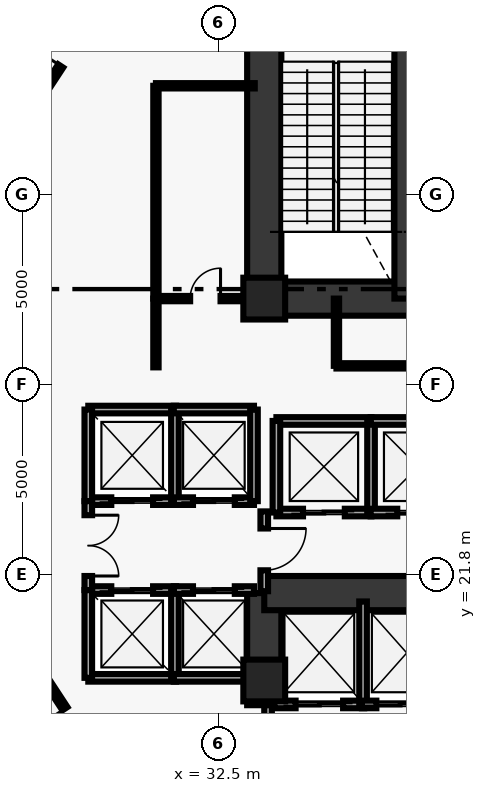
"""IFC4 building model, lengths in metres.
Left out: names, types, materials, properties, quantities, classifications, styles, units other than length and angle.
Written with IfcOpenShell. Run it as: python <this file> out.ifc"""

import sys

from ifc_helpers import new_model, si_unit, direction, frame, frame_2d, origin, origin_2d, place, context, subcontext, project, spatial, rectangle, extrude, element, fill, save


model = new_model("IFC4")
c1 = context("Model", 3, precision=1e-05, world=origin(), true_north=direction((0.0, 1.0)))
c2 = subcontext(c1, "Body", "Model", "MODEL_VIEW")
j1 = project(units=[si_unit("LENGTHUNIT", "METRE"), si_unit("PLANEANGLEUNIT", "RADIAN")], contexts=[c1])
p1 = place(None, origin())
s1 = spatial("IfcSite", under=j1, at=p1, CompositionType="ELEMENT")
p2 = place(p1, origin())
s2 = spatial("IfcBuilding", under=s1, at=p2, CompositionType="ELEMENT")
p3 = place(p2, origin())
s3 = spatial("IfcBuildingStorey", under=s2, at=p3, CompositionType="ELEMENT", Elevation=0.0)
for number, where, z_axis, x_axis in (
    (1, (33.7, 19.0, 0.0), (0.0, 0.0, 1.0), (1.0, 0.0, 0.0)),
    (2, (33.7, 29.05, 0.0), (0.0, 0.0, 1.0), (1.0, 0.0, 0.0)),
):
    element("IfcColumn", number, at=place(p3, frame(where, z_axis=z_axis, x_axis=x_axis)), inside=s3, PredefinedType="PILASTER", context=c2, shape_type="SweptSolid", body=[
        extrude(rectangle(XDim=1.1, YDim=1.1, at=origin_2d()), origin(), (0.0, 0.0, 1.0), 5.7),
    ])
p4 = place(p3, frame((33.7, 29.05, 0.0), z_axis=(0.0, 0.0, 1.0), x_axis=(0.0, 1.0, 0.0)))
e3 = element("IfcWall", 3, at=p4, inside=s3, PredefinedType="SHEAR", context=c2, shape_type="SweptSolid", body=[
    extrude(rectangle(XDim=8.35, YDim=0.9, at=frame_2d((4.175, 0.0))), origin(), (0.0, 0.0, 1.0), 5.7),
])
p5 = place(p3, frame((33.7, 18.35, 0.0), z_axis=(0.0, 0.0, 1.0), x_axis=(0.0, 1.0, 0.0)))
e4 = element("IfcWall", 4, at=p5, inside=s3, PredefinedType="SHEAR", context=c2, shape_type="SweptSolid", body=[
    extrude(rectangle(XDim=2.95, YDim=0.9, at=frame_2d((1.475, 0.0))), origin(), (0.0, 0.0, 1.0), 5.7),
])
p6 = place(p3, frame((33.7, 29.05, 0.0), z_axis=(0.0, 0.0, 1.0), x_axis=(1.0, 0.0, 0.0)))
e5 = element("IfcWall", 5, at=p6, inside=s3, PredefinedType="SHEAR", context=c2, shape_type="SweptSolid", body=[
    extrude(rectangle(XDim=10.6, YDim=0.9, at=frame_2d((5.3, 0.0))), origin(), (0.0, 0.0, 1.0), 5.7),
])
p7 = place(p3, frame((33.7, 21.3, 0.0), z_axis=(0.0, 0.0, 1.0), x_axis=(1.0, 0.0, 0.0)))
e6 = element("IfcWall", 6, at=p7, inside=s3, PredefinedType="SHEAR", context=c2, shape_type="SweptSolid", body=[
    extrude(rectangle(XDim=7.55, YDim=0.9, at=frame_2d((3.775, 0.0))), origin(), (0.0, 0.0, 1.0), 5.7),
])
p8 = place(p3, frame((37.35, 29.05, 0.0), z_axis=(0.0, 0.0, 1.0), x_axis=(0.0, 1.0, 0.0)))
e7 = element("IfcWall", 7, at=p8, inside=s3, PredefinedType="SHEAR", context=c2, shape_type="SweptSolid", body=[
    extrude(rectangle(XDim=8.35, YDim=0.45, at=frame_2d((4.175, 0.0))), origin(), (0.0, 0.0, 1.0), 5.7),
])
p9 = place(p3, frame((35.6, 27.28, 0.0), z_axis=(0.0, 0.0, 1.0), x_axis=(0.0, 1.0, 0.0)))
e8 = element("IfcWall", 8, at=p9, inside=s3, PredefinedType="PARTITIONING", context=c2, shape_type="SweptSolid", body=[
    extrude(rectangle(XDim=1.77, YDim=0.14, at=frame_2d((0.885, 0.0))), origin(), (0.0, 0.0, 1.0), 5.7),
])
p10 = place(p3, frame((29.07, 23.72, 0.0), z_axis=(0.0, 0.0, 1.0), x_axis=(1.0, 0.0, 0.0)))
e9 = element("IfcWall", 9, at=p10, inside=s3, PredefinedType="SOLIDWALL", context=c2, shape_type="SweptSolid", body=[
    extrude(rectangle(XDim=2.31, YDim=0.2, at=frame_2d((1.155, 0.0))), origin(), (0.0, 0.0, 1.0), 5.7),
])
p11 = place(p10, frame((0.605, 0.0, 0.0)))
e10 = element("IfcOpeningElement", 10, at=p11, cuts=e9, PredefinedType="OPENING", context=c2, shape_type="SweptSolid", body=[
    extrude(rectangle(XDim=1.1, YDim=2.15, at=frame_2d((0.55, 1.075))), frame((0.0, 0.11, 0.0), z_axis=(0.0, -1.0, 0.0), x_axis=(1.0, 0.0, 0.0)), (0.0, 0.0, 1.0), 0.22),
])
p12 = place(p3, frame((29.07, 26.13, 0.0), z_axis=(0.0, 0.0, 1.0), x_axis=(1.0, 0.0, 0.0)))
e11 = element("IfcWall", 11, at=p12, inside=s3, PredefinedType="SOLIDWALL", context=c2, shape_type="SweptSolid", body=[
    extrude(rectangle(XDim=2.31, YDim=0.2, at=frame_2d((1.155, 0.0))), origin(), (0.0, 0.0, 1.0), 5.7),
])
for number, where, z_axis, x_axis in (
    (12, (29.07, 23.72, 0.0), (0.0, 0.0, 1.0), (0.0, 1.0, 0.0)),
    (13, (31.35, 23.72, 0.0), (0.0, 0.0, 1.0), (0.0, 1.0, 0.0)),
):
    element("IfcWall", number, at=place(p3, frame(where, z_axis=z_axis, x_axis=x_axis)), inside=s3, PredefinedType="SOLIDWALL", context=c2, shape_type="SweptSolid", body=[
        extrude(rectangle(XDim=2.41, YDim=0.2, at=frame_2d((1.205, 0.0))), origin(), (0.0, 0.0, 1.0), 5.7),
    ])
p13 = place(p3, frame((31.32, 23.72, 0.0), z_axis=(0.0, 0.0, 1.0), x_axis=(1.0, 0.0, 0.0)))
e14 = element("IfcWall", 14, at=p13, inside=s3, PredefinedType="SOLIDWALL", context=c2, shape_type="SweptSolid", body=[
    extrude(rectangle(XDim=2.11, YDim=0.2, at=frame_2d((1.055, 0.0))), origin(), (0.0, 0.0, 1.0), 5.7),
])
p14 = place(p13, frame((0.505, 0.0, 0.0)))
e15 = element("IfcOpeningElement", 15, at=p14, cuts=e14, PredefinedType="OPENING", context=c2, shape_type="SweptSolid", body=[
    extrude(rectangle(XDim=1.1, YDim=2.15, at=frame_2d((0.55, 1.075))), frame((0.0, 0.11, 0.0), z_axis=(0.0, -1.0, 0.0), x_axis=(1.0, 0.0, 0.0)), (0.0, 0.0, 1.0), 0.22),
])
p15 = place(p3, frame((31.32, 26.13, 0.0), z_axis=(0.0, 0.0, 1.0), x_axis=(1.0, 0.0, 0.0)))
e16 = element("IfcWall", 16, at=p15, inside=s3, PredefinedType="SOLIDWALL", context=c2, shape_type="SweptSolid", body=[
    extrude(rectangle(XDim=2.11, YDim=0.2, at=frame_2d((1.055, 0.0))), origin(), (0.0, 0.0, 1.0), 5.7),
])
p16 = place(p3, frame((33.43, 23.72, 0.0), z_axis=(0.0, 0.0, 1.0), x_axis=(0.0, 1.0, 0.0)))
e17 = element("IfcWall", 17, at=p16, inside=s3, PredefinedType="SOLIDWALL", context=c2, shape_type="SweptSolid", body=[
    extrude(rectangle(XDim=2.41, YDim=0.2, at=frame_2d((1.205, 0.0))), origin(), (0.0, 0.0, 1.0), 5.7),
])
p17 = place(p3, frame((29.07, 19.07, 0.0), z_axis=(0.0, 0.0, 1.0), x_axis=(1.0, 0.0, 0.0)))
e18 = element("IfcWall", 18, at=p17, inside=s3, PredefinedType="SOLIDWALL", context=c2, shape_type="SweptSolid", body=[
    extrude(rectangle(XDim=2.31, YDim=0.2, at=frame_2d((1.155, 0.0))), origin(), (0.0, 0.0, 1.0), 5.7),
])
p18 = place(p3, frame((29.07, 21.38, 0.0), z_axis=(0.0, 0.0, 1.0), x_axis=(1.0, 0.0, 0.0)))
e19 = element("IfcWall", 19, at=p18, inside=s3, PredefinedType="SOLIDWALL", context=c2, shape_type="SweptSolid", body=[
    extrude(rectangle(XDim=2.31, YDim=0.2, at=frame_2d((1.155, 0.0))), origin(), (0.0, 0.0, 1.0), 5.7),
])
p19 = place(p18, frame((0.605, 0.0, 0.0)))
e20 = element("IfcOpeningElement", 20, at=p19, cuts=e19, PredefinedType="OPENING", context=c2, shape_type="SweptSolid", body=[
    extrude(rectangle(XDim=1.1, YDim=2.15, at=frame_2d((0.55, 1.075))), frame((0.0, 0.11, 0.0), z_axis=(0.0, -1.0, 0.0), x_axis=(1.0, 0.0, 0.0)), (0.0, 0.0, 1.0), 0.22),
])
for number, where, z_axis, x_axis in (
    (21, (29.07, 19.07, 0.0), (0.0, 0.0, 1.0), (0.0, 1.0, 0.0)),
    (22, (31.35, 19.07, 0.0), (0.0, 0.0, 1.0), (0.0, 1.0, 0.0)),
):
    element("IfcWall", number, at=place(p3, frame(where, z_axis=z_axis, x_axis=x_axis)), inside=s3, PredefinedType="SOLIDWALL", context=c2, shape_type="SweptSolid", body=[
        extrude(rectangle(XDim=2.31, YDim=0.2, at=frame_2d((1.155, 0.0))), origin(), (0.0, 0.0, 1.0), 5.7),
    ])
p20 = place(p3, frame((31.32, 19.07, 0.0), z_axis=(0.0, 0.0, 1.0), x_axis=(1.0, 0.0, 0.0)))
e23 = element("IfcWall", 23, at=p20, inside=s3, PredefinedType="SOLIDWALL", context=c2, shape_type="SweptSolid", body=[
    extrude(rectangle(XDim=2.11, YDim=0.2, at=frame_2d((1.055, 0.0))), origin(), (0.0, 0.0, 1.0), 5.7),
])
p21 = place(p3, frame((31.32, 21.38, 0.0), z_axis=(0.0, 0.0, 1.0), x_axis=(1.0, 0.0, 0.0)))
e24 = element("IfcWall", 24, at=p21, inside=s3, PredefinedType="SOLIDWALL", context=c2, shape_type="SweptSolid", body=[
    extrude(rectangle(XDim=2.11, YDim=0.2, at=frame_2d((1.055, 0.0))), origin(), (0.0, 0.0, 1.0), 5.7),
])
p22 = place(p21, frame((0.505, 0.0, 0.0)))
e25 = element("IfcOpeningElement", 25, at=p22, cuts=e24, PredefinedType="OPENING", context=c2, shape_type="SweptSolid", body=[
    extrude(rectangle(XDim=1.1, YDim=2.15, at=frame_2d((0.55, 1.075))), frame((0.0, 0.11, 0.0), z_axis=(0.0, -1.0, 0.0), x_axis=(1.0, 0.0, 0.0)), (0.0, 0.0, 1.0), 0.22),
])
p23 = place(p3, frame((34.02, 23.42, 0.0), z_axis=(0.0, 0.0, 1.0), x_axis=(1.0, 0.0, 0.0)))
e26 = element("IfcWall", 26, at=p23, inside=s3, PredefinedType="SOLIDWALL", context=c2, shape_type="SweptSolid", body=[
    extrude(rectangle(XDim=2.5, YDim=0.2, at=frame_2d((1.25, 0.0))), origin(), (0.0, 0.0, 1.0), 5.7),
])
p24 = place(p23, frame((0.7, 0.0, 0.0)))
e27 = element("IfcOpeningElement", 27, at=p24, cuts=e26, PredefinedType="OPENING", context=c2, shape_type="SweptSolid", body=[
    extrude(rectangle(XDim=1.1, YDim=2.15, at=frame_2d((0.55, 1.075))), frame((0.0, 0.11, 0.0), z_axis=(0.0, -1.0, 0.0), x_axis=(1.0, 0.0, 0.0)), (0.0, 0.0, 1.0), 0.22),
])
p25 = place(p3, frame((34.02, 25.83, 0.0), z_axis=(0.0, 0.0, 1.0), x_axis=(1.0, 0.0, 0.0)))
e28 = element("IfcWall", 28, at=p25, inside=s3, PredefinedType="SOLIDWALL", context=c2, shape_type="SweptSolid", body=[
    extrude(rectangle(XDim=2.5, YDim=0.2, at=frame_2d((1.25, 0.0))), origin(), (0.0, 0.0, 1.0), 5.7),
])
for number, where, z_axis, x_axis in (
    (29, (34.02, 23.42, 0.0), (0.0, 0.0, 1.0), (0.0, 1.0, 0.0)),
    (30, (36.51, 23.42, 0.0), (0.0, 0.0, 1.0), (0.0, 1.0, 0.0)),
):
    element("IfcWall", number, at=place(p3, frame(where, z_axis=z_axis, x_axis=x_axis)), inside=s3, PredefinedType="SOLIDWALL", context=c2, shape_type="SweptSolid", body=[
        extrude(rectangle(XDim=2.41, YDim=0.2, at=frame_2d((1.205, 0.0))), origin(), (0.0, 0.0, 1.0), 5.7),
    ])
p26 = place(p3, frame((36.5, 23.42, 0.0), z_axis=(0.0, 0.0, 1.0), x_axis=(1.0, 0.0, 0.0)))
e31 = element("IfcWall", 31, at=p26, inside=s3, PredefinedType="SOLIDWALL", context=c2, shape_type="SweptSolid", body=[
    extrude(rectangle(XDim=2.5, YDim=0.2, at=frame_2d((1.25, 0.0))), origin(), (0.0, 0.0, 1.0), 5.7),
])
p27 = place(p26, frame((0.7, 0.0, 0.0)))
e32 = element("IfcOpeningElement", 32, at=p27, cuts=e31, PredefinedType="OPENING", context=c2, shape_type="SweptSolid", body=[
    extrude(rectangle(XDim=1.1, YDim=2.15, at=frame_2d((0.55, 1.075))), frame((0.0, 0.11, 0.0), z_axis=(0.0, -1.0, 0.0), x_axis=(1.0, 0.0, 0.0)), (0.0, 0.0, 1.0), 0.22),
])
p28 = place(p3, frame((36.5, 25.83, 0.0), z_axis=(0.0, 0.0, 1.0), x_axis=(1.0, 0.0, 0.0)))
e33 = element("IfcWall", 33, at=p28, inside=s3, PredefinedType="SOLIDWALL", context=c2, shape_type="SweptSolid", body=[
    extrude(rectangle(XDim=2.5, YDim=0.2, at=frame_2d((1.25, 0.0))), origin(), (0.0, 0.0, 1.0), 5.7),
])
p29 = place(p3, frame((33.97, 18.37, 0.0), z_axis=(0.0, 0.0, 1.0), x_axis=(1.0, 0.0, 0.0)))
e34 = element("IfcWall", 34, at=p29, inside=s3, PredefinedType="SOLIDWALL", context=c2, shape_type="SweptSolid", body=[
    extrude(rectangle(XDim=2.36, YDim=0.2, at=frame_2d((1.18, 0.0))), origin(), (0.0, 0.0, 1.0), 5.7),
])
p30 = place(p29, frame((0.555, 0.0, 0.0)))
e35 = element("IfcOpeningElement", 35, at=p30, cuts=e34, PredefinedType="OPENING", context=c2, shape_type="SweptSolid", body=[
    extrude(rectangle(XDim=1.25, YDim=2.2, at=frame_2d((0.625, 1.1))), frame((0.0, 0.11, 0.0), z_axis=(0.0, -1.0, 0.0), x_axis=(1.0, 0.0, 0.0)), (0.0, 0.0, 1.0), 0.22),
])
p31 = place(p3, frame((36.3, 18.37, 0.0), z_axis=(0.0, 0.0, 1.0), x_axis=(0.0, 1.0, 0.0)))
e36 = element("IfcWall", 36, at=p31, inside=s3, PredefinedType="SOLIDWALL", context=c2, shape_type="SweptSolid", body=[
    extrude(rectangle(XDim=2.71, YDim=0.2, at=frame_2d((1.355, 0.0))), origin(), (0.0, 0.0, 1.0), 5.7),
])
p32 = place(p3, frame((36.27, 18.37, 0.0), z_axis=(0.0, 0.0, 1.0), x_axis=(1.0, 0.0, 0.0)))
e37 = element("IfcWall", 37, at=p32, inside=s3, PredefinedType="SOLIDWALL", context=c2, shape_type="SweptSolid", body=[
    extrude(rectangle(XDim=2.36, YDim=0.2, at=frame_2d((1.18, 0.0))), origin(), (0.0, 0.0, 1.0), 5.7),
])
p33 = place(p32, frame((0.38, 0.0, 0.0)))
e38 = element("IfcOpeningElement", 38, at=p33, cuts=e37, PredefinedType="OPENING", context=c2, shape_type="SweptSolid", body=[
    extrude(rectangle(XDim=1.25, YDim=2.2, at=frame_2d((0.625, 1.1))), frame((0.0, 0.11, 0.0), z_axis=(0.0, -1.0, 0.0), x_axis=(1.0, 0.0, 0.0)), (0.0, 0.0, 1.0), 0.22),
])
p34 = place(p3, frame((29.07, 21.38, 0.0), z_axis=(0.0, 0.0, 1.0), x_axis=(0.0, 1.0, 0.0)))
e39 = element("IfcWall", 39, at=p34, inside=s3, PredefinedType="SOLIDWALL", context=c2, shape_type="SweptSolid", body=[
    extrude(rectangle(XDim=2.34, YDim=0.2, at=frame_2d((1.17, 0.0))), origin(), (0.0, 0.0, 1.0), 5.7),
])
p35 = place(p34, frame((0.37, 0.0, 0.0)))
e40 = element("IfcOpeningElement", 40, at=p35, cuts=e39, PredefinedType="OPENING", context=c2, shape_type="SweptSolid", body=[
    extrude(rectangle(XDim=1.6, YDim=2.2, at=frame_2d((0.8, 1.1))), frame((0.0, 0.11, 0.0), z_axis=(0.0, -1.0, 0.0), x_axis=(1.0, 0.0, 0.0)), (0.0, 0.0, 1.0), 0.22),
])
p36 = place(p3, frame((33.7, 21.35, 0.0), z_axis=(0.0, 0.0, 1.0), x_axis=(0.0, 1.0, 0.0)))
e41 = element("IfcWall", 41, at=p36, inside=s3, PredefinedType="SOLIDWALL", context=c2, shape_type="SweptSolid", body=[
    extrude(rectangle(XDim=2.1, YDim=0.2, at=frame_2d((1.05, 0.0))), origin(), (0.0, 0.0, 1.0), 4.92),
])
p37 = place(p36, frame((0.55, 0.0, 0.0)))
e42 = element("IfcOpeningElement", 42, at=p37, cuts=e41, PredefinedType="OPENING", context=c2, shape_type="SweptSolid", body=[
    extrude(rectangle(XDim=1.1, YDim=2.15, at=frame_2d((0.55, 1.075))), frame((0.0, 0.11, 0.0), z_axis=(0.0, -1.0, 0.0), x_axis=(1.0, 0.0, 0.0)), (0.0, 0.0, 1.0), 0.22),
])
p38 = place(p3, frame((33.8, 15.55, 0.0), z_axis=(0.0, 0.0, 1.0), x_axis=(0.0, 1.0, 0.0)))
e43 = element("IfcWall", 43, at=p38, inside=s3, PredefinedType="SOLIDWALL", context=c2, shape_type="SweptSolid", body=[
    extrude(rectangle(XDim=2.8, YDim=0.2, at=frame_2d((1.4, 0.0))), origin(), (0.0, 0.0, 1.0), 5.7),
])
p39 = place(p3, frame((35.6, 27.28, 0.0), z_axis=(0.0, 0.0, 1.0), x_axis=(1.0, 0.0, 0.0)))
e44 = element("IfcWall", 44, at=p39, inside=s3, PredefinedType="PARTITIONING", context=c2, shape_type="SweptSolid", body=[
    extrude(rectangle(XDim=5.4, YDim=0.14, at=frame_2d((2.7, 0.0))), origin(), (0.0, 0.0, 1.0), 5.7),
])
p40 = place(p39, frame((2.225, 0.0, 0.0)))
e45 = element("IfcOpeningElement", 45, at=p40, cuts=e44, PredefinedType="OPENING", context=c2, shape_type="SweptSolid", body=[
    extrude(rectangle(XDim=0.95, YDim=2.1, at=frame_2d((0.475, 1.05))), frame((0.0, 0.08, 0.0), z_axis=(0.0, -1.0, 0.0), x_axis=(1.0, 0.0, 0.0)), (0.0, 0.0, 1.0), 0.16),
])
p41 = place(p3, frame((30.85, 27.24, 0.0), z_axis=(0.0, 0.0, 1.0), x_axis=(0.0, 1.0, 0.0)))
e46 = element("IfcWall", 46, at=p41, inside=s3, PredefinedType="PARTITIONING", context=c2, shape_type="SweptSolid", body=[
    extrude(rectangle(XDim=1.81, YDim=0.14, at=frame_2d((0.905, 0.0))), origin(), (0.0, 0.0, 1.0), 5.7),
])
p42 = place(p3, frame((30.85, 29.05, 0.0), z_axis=(0.0, 0.0, 1.0), x_axis=(1.0, 0.0, 0.0)))
e47 = element("IfcWall", 47, at=p42, inside=s3, PredefinedType="PARTITIONING", context=c2, shape_type="SweptSolid", body=[
    extrude(rectangle(XDim=2.6, YDim=0.14, at=frame_2d((1.3, 0.0))), origin(), (0.0, 0.0, 1.0), 4.66),
])
p43 = place(p42, frame((0.9, 0.0, 0.0)))
e48 = element("IfcOpeningElement", 48, at=p43, cuts=e47, PredefinedType="OPENING", context=c2, shape_type="SweptSolid", body=[
    extrude(rectangle(XDim=0.8, YDim=2.05, at=frame_2d((0.4, 1.025))), frame((0.0, 0.08, 0.0), z_axis=(0.0, -1.0, 0.0), x_axis=(1.0, 0.0, 0.0)), (0.0, 0.0, 1.0), 0.16),
])
p44 = place(p3, frame((30.85, 34.65, 0.0), z_axis=(0.0, 0.0, 1.0), x_axis=(1.0, 0.0, 0.0)))
e49 = element("IfcWall", 49, at=p44, inside=s3, PredefinedType="PARTITIONING", context=c2, shape_type="SweptSolid", body=[
    extrude(rectangle(XDim=2.6, YDim=0.14, at=frame_2d((1.3, 0.0))), origin(), (0.0, 0.0, 1.0), 5.7),
])
p45 = place(p3, frame((30.85, 29.05, 0.0), z_axis=(0.0, 0.0, 1.0), x_axis=(0.0, 1.0, 0.0)))
e50 = element("IfcWall", 50, at=p45, inside=s3, PredefinedType="PARTITIONING", context=c2, shape_type="SweptSolid", body=[
    extrude(rectangle(XDim=5.6, YDim=0.14, at=frame_2d((2.8, 0.0))), origin(), (0.0, 0.0, 1.0), 5.7),
])
p46 = place(p3, frame((27.811, 34.36, 0.0), z_axis=(0.0, 0.0, 1.0), x_axis=(0.548348738977, 0.836249759619, 0.0)))
e51 = element("IfcWall", 51, at=p46, inside=s3, PredefinedType="PARTITIONING", context=c2, shape_type="SweptSolid", body=[
    extrude(rectangle(XDim=3.744, YDim=0.16, at=frame_2d((1.872, 0.0))), origin(), (0.0, 0.0, 1.0), 5.7),
])
p47 = place(p46, frame((0.972, 0.0, 0.0)))
e52 = element("IfcOpeningElement", 52, at=p47, cuts=e51, PredefinedType="OPENING", context=c2, shape_type="SweptSolid", body=[
    extrude(rectangle(XDim=1.8, YDim=2.3, at=frame_2d((0.9, 1.15))), frame((0.0, 0.09, 0.0), z_axis=(0.0, -1.0, 0.0), x_axis=(1.0, 0.0, 0.0)), (0.0, 0.0, 1.0), 0.18),
])
p48 = place(p3, frame((29.864, 16.109, 0.0), z_axis=(0.0, 0.0, 1.0), x_axis=(-0.548318837904, 0.836269365694, 0.0)))
e53 = element("IfcWall", 53, at=p48, inside=s3, PredefinedType="PARTITIONING", context=c2, shape_type="SweptSolid", body=[
    extrude(rectangle(XDim=3.744, YDim=0.16, at=frame_2d((1.872, 0.0))), origin(), (0.0, 0.0, 1.0), 5.7),
])
p49 = place(p48, frame((0.969, 0.0, 0.0)))
e54 = element("IfcOpeningElement", 54, at=p49, cuts=e53, PredefinedType="OPENING", context=c2, shape_type="SweptSolid", body=[
    extrude(rectangle(XDim=1.6, YDim=2.2, at=frame_2d((0.8, 1.1))), frame((0.0, 0.09, 0.0), z_axis=(0.0, -1.0, 0.0), x_axis=(1.0, 0.0, 0.0)), (0.0, 0.0, 1.0), 0.18),
])
p50 = place(p11, origin())
e55 = element("IfcDoor", 55, at=p50, inside=s3, OperationType="DOUBLE_DOOR_SLIDING", PredefinedType="DOOR", context=c2, shape_type="SweptSolid", body=[
    extrude(rectangle(XDim=1.1, YDim=2.15, at=frame_2d((0.55, 1.075))), frame((0.0, 0.025, 0.0), z_axis=(0.0, -1.0, 0.0), x_axis=(1.0, 0.0, 0.0)), (0.0, 0.0, 1.0), 0.05),
])
fill(e10, e55)
p51 = place(p14, origin())
e56 = element("IfcDoor", 56, at=p51, inside=s3, OperationType="DOUBLE_DOOR_SLIDING", PredefinedType="DOOR", context=c2, shape_type="SweptSolid", body=[
    extrude(rectangle(XDim=1.1, YDim=2.15, at=frame_2d((0.55, 1.075))), frame((0.0, 0.025, 0.0), z_axis=(0.0, -1.0, 0.0), x_axis=(1.0, 0.0, 0.0)), (0.0, 0.0, 1.0), 0.05),
])
fill(e15, e56)
p52 = place(p19, origin())
e57 = element("IfcDoor", 57, at=p52, inside=s3, OperationType="DOUBLE_DOOR_SLIDING", PredefinedType="DOOR", context=c2, shape_type="SweptSolid", body=[
    extrude(rectangle(XDim=1.1, YDim=2.15, at=frame_2d((0.55, 1.075))), frame((0.0, 0.025, 0.0), z_axis=(0.0, -1.0, 0.0), x_axis=(1.0, 0.0, 0.0)), (0.0, 0.0, 1.0), 0.05),
])
fill(e20, e57)
p53 = place(p22, origin())
e58 = element("IfcDoor", 58, at=p53, inside=s3, OperationType="DOUBLE_DOOR_SLIDING", PredefinedType="DOOR", context=c2, shape_type="SweptSolid", body=[
    extrude(rectangle(XDim=1.1, YDim=2.15, at=frame_2d((0.55, 1.075))), frame((0.0, 0.025, 0.0), z_axis=(0.0, -1.0, 0.0), x_axis=(1.0, 0.0, 0.0)), (0.0, 0.0, 1.0), 0.05),
])
fill(e25, e58)
p54 = place(p24, origin())
e59 = element("IfcDoor", 59, at=p54, inside=s3, OperationType="DOUBLE_DOOR_SLIDING", PredefinedType="DOOR", context=c2, shape_type="SweptSolid", body=[
    extrude(rectangle(XDim=1.1, YDim=2.15, at=frame_2d((0.55, 1.075))), frame((0.0, 0.025, 0.0), z_axis=(0.0, -1.0, 0.0), x_axis=(1.0, 0.0, 0.0)), (0.0, 0.0, 1.0), 0.05),
])
fill(e27, e59)
p55 = place(p27, origin())
e60 = element("IfcDoor", 60, at=p55, inside=s3, OperationType="DOUBLE_DOOR_SLIDING", PredefinedType="DOOR", context=c2, shape_type="SweptSolid", body=[
    extrude(rectangle(XDim=1.1, YDim=2.15, at=frame_2d((0.55, 1.075))), frame((0.0, 0.025, 0.0), z_axis=(0.0, -1.0, 0.0), x_axis=(1.0, 0.0, 0.0)), (0.0, 0.0, 1.0), 0.05),
])
fill(e32, e60)
p56 = place(p30, origin())
e61 = element("IfcDoor", 61, at=p56, inside=s3, OperationType="DOUBLE_DOOR_SLIDING", PredefinedType="DOOR", context=c2, shape_type="SweptSolid", body=[
    extrude(rectangle(XDim=1.25, YDim=2.2, at=frame_2d((0.625, 1.1))), frame((0.0, 0.025, 0.0), z_axis=(0.0, -1.0, 0.0), x_axis=(1.0, 0.0, 0.0)), (0.0, 0.0, 1.0), 0.05),
])
fill(e35, e61)
p57 = place(p33, origin())
e62 = element("IfcDoor", 62, at=p57, inside=s3, OperationType="DOUBLE_DOOR_SLIDING", PredefinedType="DOOR", context=c2, shape_type="SweptSolid", body=[
    extrude(rectangle(XDim=1.25, YDim=2.2, at=frame_2d((0.625, 1.1))), frame((0.0, 0.025, 0.0), z_axis=(0.0, -1.0, 0.0), x_axis=(1.0, 0.0, 0.0)), (0.0, 0.0, 1.0), 0.05),
])
fill(e38, e62)
p58 = place(p35, origin())
e63 = element("IfcDoor", 63, at=p58, inside=s3, OperationType="DOUBLE_DOOR_SINGLE_SWING", PredefinedType="DOOR", context=c2, shape_type="SweptSolid", body=[
    extrude(rectangle(XDim=1.6, YDim=2.2, at=frame_2d((0.8, 1.1))), frame((0.0, 0.025, 0.0), z_axis=(0.0, -1.0, 0.0), x_axis=(1.0, 0.0, 0.0)), (0.0, 0.0, 1.0), 0.05),
])
fill(e40, e63)
p59 = place(p37, origin())
e64 = element("IfcDoor", 64, at=p59, inside=s3, OperationType="SINGLE_SWING_RIGHT", PredefinedType="DOOR", context=c2, shape_type="SweptSolid", body=[
    extrude(rectangle(XDim=1.1, YDim=2.15, at=frame_2d((0.55, 1.075))), frame((0.0, 0.025, 0.0), z_axis=(0.0, -1.0, 0.0), x_axis=(1.0, 0.0, 0.0)), (0.0, 0.0, 1.0), 0.05),
])
fill(e42, e64)
p60 = place(p43, origin())
e65 = element("IfcDoor", 65, at=p60, inside=s3, OperationType="SINGLE_SWING_RIGHT", PredefinedType="DOOR", context=c2, shape_type="SweptSolid", body=[
    extrude(rectangle(XDim=0.8, YDim=2.05, at=frame_2d((0.4, 1.025))), frame((0.0, 0.025, 0.0), z_axis=(0.0, -1.0, 0.0), x_axis=(1.0, 0.0, 0.0)), (0.0, 0.0, 1.0), 0.05),
])
fill(e48, e65)
p61 = place(p47, origin())
e66 = element("IfcDoor", 66, at=p61, inside=s3, OperationType="DOUBLE_DOOR_SINGLE_SWING", PredefinedType="DOOR", context=c2, shape_type="SweptSolid", body=[
    extrude(rectangle(XDim=1.8, YDim=2.3, at=frame_2d((0.9, 1.15))), frame((0.0, 0.025, 0.0), z_axis=(0.0, -1.0, 0.0), x_axis=(1.0, 0.0, 0.0)), (0.0, 0.0, 1.0), 0.05),
])
fill(e52, e66)
p62 = place(p49, origin())
e67 = element("IfcDoor", 67, at=p62, inside=s3, OperationType="DOUBLE_DOOR_SINGLE_SWING", PredefinedType="DOOR", context=c2, shape_type="SweptSolid", body=[
    extrude(rectangle(XDim=1.6, YDim=2.2, at=frame_2d((0.8, 1.1))), frame((0.0, 0.025, 0.0), z_axis=(0.0, -1.0, 0.0), x_axis=(1.0, 0.0, 0.0)), (0.0, 0.0, 1.0), 0.05),
])
fill(e54, e67)
save(model, sys.argv[1])
